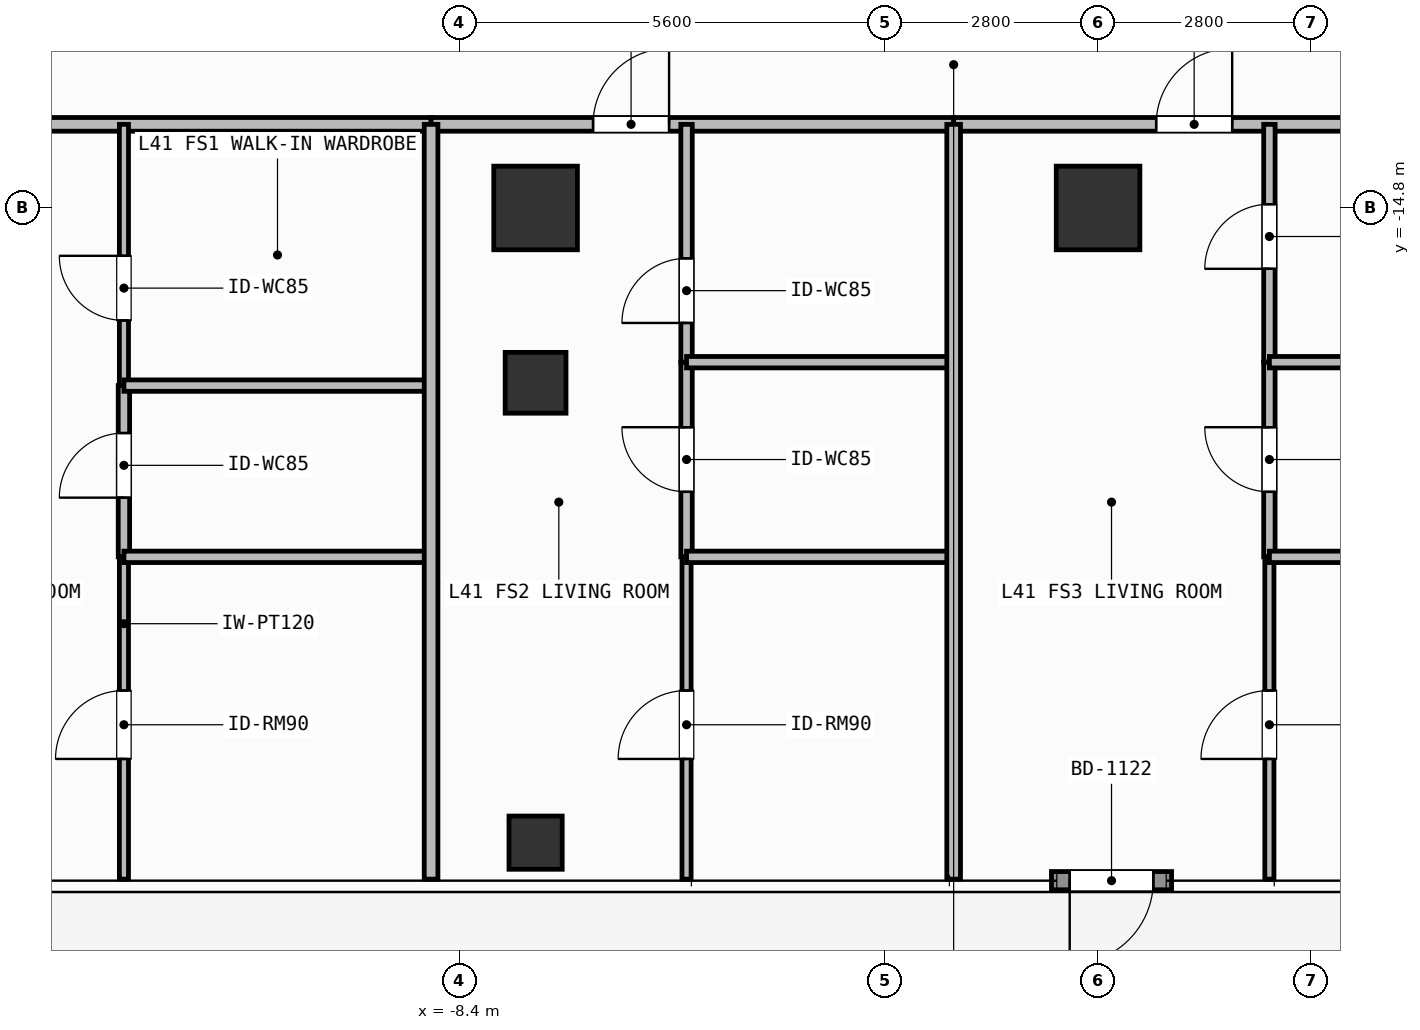
"""IFC4 building model, lengths in metres.
Left out: names, types, materials, properties, quantities, classifications, styles, units other than length and angle.
Written with IfcOpenShell. Run it as: python <this file> out.ifc"""

import sys

from ifc_helpers import new_model, si_unit, direction, frame, frame_2d, origin, origin_2d, place, context, subcontext, project, spatial, rectangle, hollow_rectangle, extrude, element, fill, save


model = new_model("IFC4")
c1 = context("Model", 3, precision=1e-05, world=origin(), true_north=direction((0.0, 1.0)))
c2 = subcontext(c1, "Body", "Model", "MODEL_VIEW")
j1 = project(units=[si_unit("LENGTHUNIT", "METRE"), si_unit("PLANEANGLEUNIT", "RADIAN")], contexts=[c1])
p1 = place(None, origin())
s1 = spatial("IfcSite", under=j1, at=p1, CompositionType="ELEMENT")
p2 = place(p1, origin())
s2 = spatial("IfcBuilding", under=s1, at=p2, CompositionType="ELEMENT")
p3 = place(p2, frame((0.0, 0.0, 168.0)))
s3 = spatial("IfcBuildingStorey", under=s2, at=p3, CompositionType="ELEMENT", Elevation=168.0)
for number, where, z_axis, x_axis in (
    (1, (-7.4, -14.8, 0.0), (0.0, 0.0, 1.0), (1.0, 0.0, 0.0)),
    (2, (0.0, -14.8, 0.0), (0.0, 0.0, 1.0), (1.0, 0.0, 0.0)),
):
    element("IfcColumn", number, at=place(p3, frame(where, z_axis=z_axis, x_axis=x_axis)), inside=s3, PredefinedType="COLUMN", context=c2, shape_type="SweptSolid", body=[
        extrude(rectangle(XDim=1.1, YDim=1.1, at=origin_2d()), origin(), (0.0, 0.0, 1.0), 3.9),
    ])
p4 = place(p3, frame((-7.4, -17.1, 0.0), z_axis=(0.0, 0.0, 1.0), x_axis=(1.0, 0.0, 0.0)))
e3 = element("IfcColumn", 3, at=p4, inside=s3, PredefinedType="COLUMN", context=c2, shape_type="SweptSolid", body=[
    extrude(hollow_rectangle(XDim=0.8, YDim=0.8, WallThickness=0.036, at=origin_2d()), origin(), (0.0, 0.0, 1.0), 3.9),
])
p5 = place(p3, frame((-7.4, -23.15, 0.0), z_axis=(0.0, 0.0, 1.0), x_axis=(1.0, 0.0, 0.0)))
e4 = element("IfcColumn", 4, at=p5, inside=s3, PredefinedType="COLUMN", context=c2, shape_type="SweptSolid", body=[
    extrude(hollow_rectangle(XDim=0.7, YDim=0.7, WallThickness=0.032, at=origin_2d()), origin(), (0.0, 0.0, 1.0), 3.9),
])
p6 = place(p3, frame((0.967, -23.65, 0.0), z_axis=(0.0, 0.0, 1.0), x_axis=(-1.0, 0.0, 0.0)))
e5 = element("IfcWall", 5, at=p6, inside=s3, PredefinedType="SOLIDWALL", context=c2, shape_type="SweptSolid", body=[
    extrude(rectangle(XDim=1.58, YDim=0.24, at=frame_2d((0.79, 0.0))), origin(), (0.0, 0.0, 1.0), 3.68),
])
p7 = place(p6, frame((0.24, 0.0, 0.0)))
e6 = element("IfcOpeningElement", 6, at=p7, cuts=e5, PredefinedType="OPENING", context=c2, shape_type="SweptSolid", body=[
    extrude(rectangle(XDim=1.1, YDim=2.2, at=frame_2d((0.55, 1.1))), frame((0.0, 0.13, 0.0), z_axis=(0.0, -1.0, 0.0), x_axis=(1.0, 0.0, 0.0)), (0.0, 0.0, 1.0), 0.26),
])
p8 = place(p3, frame((-22.12, -13.7, 0.0), z_axis=(0.0, 0.0, 1.0), x_axis=(1.0, 0.0, 0.0)))
e7 = element("IfcWall", 7, at=p8, inside=s3, PredefinedType="PARTITIONING", context=c2, shape_type="SweptSolid", body=[
    extrude(rectangle(XDim=13.345, YDim=0.18, at=frame_2d((6.673, 0.0))), origin(), (0.0, 0.0, 1.0), 3.68),
])
p9 = place(p8, frame((5.724, 0.0, 0.0)))
e8 = element("IfcOpeningElement", 8, at=p9, cuts=e7, PredefinedType="OPENING", context=c2, shape_type="SweptSolid", body=[
    extrude(rectangle(XDim=1.0, YDim=2.2, at=frame_2d((0.5, 1.1))), frame((0.0, 0.1, 0.0), z_axis=(0.0, -1.0, 0.0), x_axis=(1.0, 0.0, 0.0)), (0.0, 0.0, 1.0), 0.2),
])
p10 = place(p3, frame((-12.816, -19.39, 0.0), z_axis=(0.0, 0.0, 1.0), x_axis=(0.0, 1.0, 0.0)))
e9 = element("IfcWall", 9, at=p10, inside=s3, PredefinedType="PARTITIONING", context=c2, shape_type="SweptSolid", body=[
    extrude(rectangle(XDim=2.253, YDim=0.15, at=frame_2d((1.126, 0.0))), origin(), (0.0, 0.0, 1.0), 3.68),
])
p11 = place(p10, frame((0.779, 0.0, 0.0)))
e10 = element("IfcOpeningElement", 10, at=p11, cuts=e9, PredefinedType="OPENING", context=c2, shape_type="SweptSolid", body=[
    extrude(rectangle(XDim=0.85, YDim=2.1, at=frame_2d((0.425, 1.05))), frame((0.0, 0.085, 0.0), z_axis=(0.0, -1.0, 0.0), x_axis=(1.0, 0.0, 0.0)), (0.0, 0.0, 1.0), 0.17),
])
p12 = place(p3, frame((-12.816, -17.137, 0.0), z_axis=(0.0, 0.0, 1.0), x_axis=(0.0, 1.0, 0.0)))
e11 = element("IfcWall", 11, at=p12, inside=s3, PredefinedType="PARTITIONING", context=c2, shape_type="SweptSolid", body=[
    extrude(rectangle(XDim=3.437, YDim=0.12, at=frame_2d((1.719, 0.0))), origin(), (0.0, 0.0, 1.0), 3.68),
])
p13 = place(p12, frame((0.857, 0.0, 0.0)))
e12 = element("IfcOpeningElement", 12, at=p13, cuts=e11, PredefinedType="OPENING", context=c2, shape_type="SweptSolid", body=[
    extrude(rectangle(XDim=0.85, YDim=2.1, at=frame_2d((0.425, 1.05))), frame((0.0, 0.07, 0.0), z_axis=(0.0, -1.0, 0.0), x_axis=(1.0, 0.0, 0.0)), (0.0, 0.0, 1.0), 0.14),
])
p14 = place(p3, frame((-12.816, -23.63, 0.0), z_axis=(0.0, 0.0, 1.0), x_axis=(0.0, 1.0, 0.0)))
e13 = element("IfcWall", 13, at=p14, inside=s3, PredefinedType="PARTITIONING", context=c2, shape_type="SweptSolid", body=[
    extrude(rectangle(XDim=4.24, YDim=0.12, at=frame_2d((2.12, 0.0))), origin(), (0.0, 0.0, 1.0), 3.68),
])
p15 = place(p14, frame((1.581, 0.0, 0.0)))
e14 = element("IfcOpeningElement", 14, at=p15, cuts=e13, PredefinedType="OPENING", context=c2, shape_type="SweptSolid", body=[
    extrude(rectangle(XDim=0.9, YDim=2.1, at=frame_2d((0.45, 1.05))), frame((0.0, 0.07, 0.0), z_axis=(0.0, -1.0, 0.0), x_axis=(1.0, 0.0, 0.0)), (0.0, 0.0, 1.0), 0.14),
])
p16 = place(p3, frame((-8.775, -13.7, 0.0), z_axis=(0.0, 0.0, 1.0), x_axis=(1.0, 0.0, 0.0)))
e15 = element("IfcWall", 15, at=p16, inside=s3, PredefinedType="PARTITIONING", context=c2, shape_type="SweptSolid", body=[
    extrude(rectangle(XDim=6.875, YDim=0.18, at=frame_2d((3.438, 0.0))), origin(), (0.0, 0.0, 1.0), 3.68),
])
p17 = place(p16, frame((2.131, 0.0, 0.0)))
e16 = element("IfcOpeningElement", 16, at=p17, cuts=e15, PredefinedType="OPENING", context=c2, shape_type="SweptSolid", body=[
    extrude(rectangle(XDim=1.0, YDim=2.2, at=frame_2d((0.5, 1.1))), frame((0.0, 0.1, 0.0), z_axis=(0.0, -1.0, 0.0), x_axis=(1.0, 0.0, 0.0)), (0.0, 0.0, 1.0), 0.2),
])
p18 = place(p3, frame((-5.414, -16.829, 0.0), z_axis=(0.0, 0.0, 1.0), x_axis=(0.0, 1.0, 0.0)))
e17 = element("IfcWall", 17, at=p18, inside=s3, PredefinedType="PARTITIONING", context=c2, shape_type="SweptSolid", body=[
    extrude(rectangle(XDim=3.129, YDim=0.15, at=frame_2d((1.564, 0.0))), origin(), (0.0, 0.0, 1.0), 3.68),
])
p19 = place(p18, frame((0.516, 0.0, 0.0)))
e18 = element("IfcOpeningElement", 18, at=p19, cuts=e17, PredefinedType="OPENING", context=c2, shape_type="SweptSolid", body=[
    extrude(rectangle(XDim=0.85, YDim=2.1, at=frame_2d((0.425, 1.05))), frame((0.0, 0.085, 0.0), z_axis=(0.0, -1.0, 0.0), x_axis=(1.0, 0.0, 0.0)), (0.0, 0.0, 1.0), 0.17),
])
p20 = place(p3, frame((-5.414, -19.39, 0.0), z_axis=(0.0, 0.0, 1.0), x_axis=(0.0, 1.0, 0.0)))
e19 = element("IfcWall", 19, at=p20, inside=s3, PredefinedType="PARTITIONING", context=c2, shape_type="SweptSolid", body=[
    extrude(rectangle(XDim=2.561, YDim=0.15, at=frame_2d((1.28, 0.0))), origin(), (0.0, 0.0, 1.0), 3.68),
])
p21 = place(p20, frame((0.855, 0.0, 0.0)))
e20 = element("IfcOpeningElement", 20, at=p21, cuts=e19, PredefinedType="OPENING", context=c2, shape_type="SweptSolid", body=[
    extrude(rectangle(XDim=0.85, YDim=2.1, at=frame_2d((0.425, 1.05))), frame((0.0, 0.085, 0.0), z_axis=(0.0, -1.0, 0.0), x_axis=(1.0, 0.0, 0.0)), (0.0, 0.0, 1.0), 0.17),
])
p22 = place(p3, frame((-5.414, -23.63, 0.0), z_axis=(0.0, 0.0, 1.0), x_axis=(0.0, 1.0, 0.0)))
e21 = element("IfcWall", 21, at=p22, inside=s3, PredefinedType="PARTITIONING", context=c2, shape_type="SweptSolid", body=[
    extrude(rectangle(XDim=4.24, YDim=0.12, at=frame_2d((2.12, 0.0))), origin(), (0.0, 0.0, 1.0), 3.68),
])
p23 = place(p22, frame((1.581, 0.0, 0.0)))
e22 = element("IfcOpeningElement", 22, at=p23, cuts=e21, PredefinedType="OPENING", context=c2, shape_type="SweptSolid", body=[
    extrude(rectangle(XDim=0.9, YDim=2.1, at=frame_2d((0.45, 1.05))), frame((0.0, 0.07, 0.0), z_axis=(0.0, -1.0, 0.0), x_axis=(1.0, 0.0, 0.0)), (0.0, 0.0, 1.0), 0.14),
])
p24 = place(p3, frame((-1.9, -13.7, 0.0), z_axis=(0.0, 0.0, 1.0), x_axis=(1.0, 0.0, 0.0)))
e23 = element("IfcWall", 23, at=p24, inside=s3, PredefinedType="PARTITIONING", context=c2, shape_type="SweptSolid", body=[
    extrude(rectangle(XDim=8.654, YDim=0.18, at=frame_2d((4.327, 0.0))), origin(), (0.0, 0.0, 1.0), 3.68),
])
p25 = place(p24, frame((2.664, 0.0, 0.0)))
e24 = element("IfcOpeningElement", 24, at=p25, cuts=e23, PredefinedType="OPENING", context=c2, shape_type="SweptSolid", body=[
    extrude(rectangle(XDim=1.0, YDim=2.2, at=frame_2d((0.5, 1.1))), frame((0.0, 0.1, 0.0), z_axis=(0.0, -1.0, 0.0), x_axis=(1.0, 0.0, 0.0)), (0.0, 0.0, 1.0), 0.2),
])
p26 = place(p3, frame((2.254, -16.829, 0.0), z_axis=(0.0, 0.0, 1.0), x_axis=(0.0, 1.0, 0.0)))
e25 = element("IfcWall", 25, at=p26, inside=s3, PredefinedType="PARTITIONING", context=c2, shape_type="SweptSolid", body=[
    extrude(rectangle(XDim=3.129, YDim=0.15, at=frame_2d((1.564, 0.0))), origin(), (0.0, 0.0, 1.0), 3.68),
])
p27 = place(p26, frame((1.229, 0.0, 0.0)))
e26 = element("IfcOpeningElement", 26, at=p27, cuts=e25, PredefinedType="OPENING", context=c2, shape_type="SweptSolid", body=[
    extrude(rectangle(XDim=0.85, YDim=2.1, at=frame_2d((0.425, 1.05))), frame((0.0, 0.085, 0.0), z_axis=(0.0, -1.0, 0.0), x_axis=(1.0, 0.0, 0.0)), (0.0, 0.0, 1.0), 0.17),
])
p28 = place(p3, frame((2.254, -19.39, 0.0), z_axis=(0.0, 0.0, 1.0), x_axis=(0.0, 1.0, 0.0)))
e27 = element("IfcWall", 27, at=p28, inside=s3, PredefinedType="PARTITIONING", context=c2, shape_type="SweptSolid", body=[
    extrude(rectangle(XDim=2.561, YDim=0.15, at=frame_2d((1.28, 0.0))), origin(), (0.0, 0.0, 1.0), 3.68),
])
p29 = place(p28, frame((0.855, 0.0, 0.0)))
e28 = element("IfcOpeningElement", 28, at=p29, cuts=e27, PredefinedType="OPENING", context=c2, shape_type="SweptSolid", body=[
    extrude(rectangle(XDim=0.85, YDim=2.1, at=frame_2d((0.425, 1.05))), frame((0.0, 0.085, 0.0), z_axis=(0.0, -1.0, 0.0), x_axis=(1.0, 0.0, 0.0)), (0.0, 0.0, 1.0), 0.17),
])
p30 = place(p3, frame((2.254, -23.63, 0.0), z_axis=(0.0, 0.0, 1.0), x_axis=(0.0, 1.0, 0.0)))
e29 = element("IfcWall", 29, at=p30, inside=s3, PredefinedType="PARTITIONING", context=c2, shape_type="SweptSolid", body=[
    extrude(rectangle(XDim=4.24, YDim=0.12, at=frame_2d((2.12, 0.0))), origin(), (0.0, 0.0, 1.0), 3.68),
])
p31 = place(p30, frame((1.581, 0.0, 0.0)))
e30 = element("IfcOpeningElement", 30, at=p31, cuts=e29, PredefinedType="OPENING", context=c2, shape_type="SweptSolid", body=[
    extrude(rectangle(XDim=0.9, YDim=2.1, at=frame_2d((0.45, 1.05))), frame((0.0, 0.07, 0.0), z_axis=(0.0, -1.0, 0.0), x_axis=(1.0, 0.0, 0.0)), (0.0, 0.0, 1.0), 0.14),
])
p32 = place(p3, frame((-12.816, -17.137, 0.0), z_axis=(0.0, 0.0, 1.0), x_axis=(1.0, 0.0, 0.0)))
e31 = element("IfcWall", 31, at=p32, inside=s3, PredefinedType="PARTITIONING", context=c2, shape_type="SweptSolid", body=[
    extrude(rectangle(XDim=4.041, YDim=0.15, at=frame_2d((2.021, 0.0))), origin(), (0.0, 0.0, 1.0), 3.082),
])
p33 = place(p3, frame((-12.816, -19.39, 0.0), z_axis=(0.0, 0.0, 1.0), x_axis=(1.0, 0.0, 0.0)))
e32 = element("IfcWall", 32, at=p33, inside=s3, PredefinedType="PARTITIONING", context=c2, shape_type="SweptSolid", body=[
    extrude(rectangle(XDim=4.041, YDim=0.15, at=frame_2d((2.021, 0.0))), origin(), (0.0, 0.0, 1.0), 3.68),
])
p34 = place(p3, frame((-5.414, -16.829, 0.0), z_axis=(0.0, 0.0, 1.0), x_axis=(1.0, 0.0, 0.0)))
e33 = element("IfcWall", 33, at=p34, inside=s3, PredefinedType="PARTITIONING", context=c2, shape_type="SweptSolid", body=[
    extrude(rectangle(XDim=3.514, YDim=0.15, at=frame_2d((1.757, 0.0))), origin(), (0.0, 0.0, 1.0), 3.082),
])
p35 = place(p3, frame((-5.414, -19.39, 0.0), z_axis=(0.0, 0.0, 1.0), x_axis=(1.0, 0.0, 0.0)))
e34 = element("IfcWall", 34, at=p35, inside=s3, PredefinedType="PARTITIONING", context=c2, shape_type="SweptSolid", body=[
    extrude(rectangle(XDim=3.514, YDim=0.15, at=frame_2d((1.757, 0.0))), origin(), (0.0, 0.0, 1.0), 3.68),
])
p36 = place(p3, frame((-8.775, -23.63, 0.0), z_axis=(0.0, 0.0, 1.0), x_axis=(0.0, 1.0, 0.0)))
e35 = element("IfcWall", 35, at=p36, inside=s3, PredefinedType="PARTITIONING", context=c2, shape_type="SweptSolid", body=[
    extrude(rectangle(XDim=9.93, YDim=0.18, at=frame_2d((4.965, 0.0))), origin(), (0.0, 0.0, 1.0), 3.68),
])
p37 = place(p3, frame((2.254, -16.829, 0.0), z_axis=(0.0, 0.0, 1.0), x_axis=(1.0, 0.0, 0.0)))
e36 = element("IfcWall", 36, at=p37, inside=s3, PredefinedType="PARTITIONING", context=c2, shape_type="SweptSolid", body=[
    extrude(rectangle(XDim=4.5, YDim=0.15, at=frame_2d((2.25, 0.0))), origin(), (0.0, 0.0, 1.0), 3.082),
])
p38 = place(p3, frame((2.254, -19.39, 0.0), z_axis=(0.0, 0.0, 1.0), x_axis=(1.0, 0.0, 0.0)))
e37 = element("IfcWall", 37, at=p38, inside=s3, PredefinedType="PARTITIONING", context=c2, shape_type="SweptSolid", body=[
    extrude(rectangle(XDim=4.5, YDim=0.15, at=frame_2d((2.25, 0.0))), origin(), (0.0, 0.0, 1.0), 3.68),
])
p39 = place(p3, frame((-1.9, -23.63, 0.0), z_axis=(0.0, 0.0, 1.0), x_axis=(0.0, 1.0, 0.0)))
e38 = element("IfcWall", 38, at=p39, inside=s3, PredefinedType="PARTITIONING", context=c2, shape_type="SweptSolid", body=[
    extrude(rectangle(XDim=9.93, YDim=0.18, at=frame_2d((4.965, 0.0))), origin(), (0.0, 0.0, 1.0), 3.68),
])
p40 = place(p7, origin())
e39 = element("IfcDoor", 39, at=p40, inside=s3, OperationType="SINGLE_SWING_RIGHT", PredefinedType="DOOR", context=c2, shape_type="SweptSolid", body=[
    extrude(rectangle(XDim=1.1, YDim=2.2, at=frame_2d((0.55, 1.1))), frame((0.0, 0.025, 0.0), z_axis=(0.0, -1.0, 0.0), x_axis=(1.0, 0.0, 0.0)), (0.0, 0.0, 1.0), 0.05),
])
fill(e6, e39)
p41 = place(p11, origin())
e40 = element("IfcDoor", 40, at=p41, inside=s3, OperationType="SINGLE_SWING_LEFT", PredefinedType="DOOR", context=c2, shape_type="SweptSolid", body=[
    extrude(rectangle(XDim=0.85, YDim=2.1, at=frame_2d((0.425, 1.05))), frame((0.0, 0.025, 0.0), z_axis=(0.0, -1.0, 0.0), x_axis=(1.0, 0.0, 0.0)), (0.0, 0.0, 1.0), 0.05),
])
fill(e10, e40)
p42 = place(p13, origin())
e41 = element("IfcDoor", 41, at=p42, inside=s3, OperationType="SINGLE_SWING_RIGHT", PredefinedType="DOOR", context=c2, shape_type="SweptSolid", body=[
    extrude(rectangle(XDim=0.85, YDim=2.1, at=frame_2d((0.425, 1.05))), frame((0.0, 0.025, 0.0), z_axis=(0.0, -1.0, 0.0), x_axis=(1.0, 0.0, 0.0)), (0.0, 0.0, 1.0), 0.05),
])
fill(e12, e41)
p43 = place(p15, origin())
e42 = element("IfcDoor", 42, at=p43, inside=s3, OperationType="SINGLE_SWING_LEFT", PredefinedType="DOOR", context=c2, shape_type="SweptSolid", body=[
    extrude(rectangle(XDim=0.9, YDim=2.1, at=frame_2d((0.45, 1.05))), frame((0.0, 0.025, 0.0), z_axis=(0.0, -1.0, 0.0), x_axis=(1.0, 0.0, 0.0)), (0.0, 0.0, 1.0), 0.05),
])
fill(e14, e42)
p44 = place(p17, origin())
e43 = element("IfcDoor", 43, at=p44, inside=s3, OperationType="SINGLE_SWING_RIGHT", PredefinedType="DOOR", context=c2, shape_type="SweptSolid", body=[
    extrude(rectangle(XDim=1.0, YDim=2.2, at=frame_2d((0.5, 1.1))), frame((0.0, 0.025, 0.0), z_axis=(0.0, -1.0, 0.0), x_axis=(1.0, 0.0, 0.0)), (0.0, 0.0, 1.0), 0.05),
])
fill(e16, e43)
p45 = place(p19, origin())
e44 = element("IfcDoor", 44, at=p45, inside=s3, OperationType="SINGLE_SWING_LEFT", PredefinedType="DOOR", context=c2, shape_type="SweptSolid", body=[
    extrude(rectangle(XDim=0.85, YDim=2.1, at=frame_2d((0.425, 1.05))), frame((0.0, 0.025, 0.0), z_axis=(0.0, -1.0, 0.0), x_axis=(1.0, 0.0, 0.0)), (0.0, 0.0, 1.0), 0.05),
])
fill(e18, e44)
p46 = place(p21, origin())
e45 = element("IfcDoor", 45, at=p46, inside=s3, OperationType="SINGLE_SWING_RIGHT", PredefinedType="DOOR", context=c2, shape_type="SweptSolid", body=[
    extrude(rectangle(XDim=0.85, YDim=2.1, at=frame_2d((0.425, 1.05))), frame((0.0, 0.025, 0.0), z_axis=(0.0, -1.0, 0.0), x_axis=(1.0, 0.0, 0.0)), (0.0, 0.0, 1.0), 0.05),
])
fill(e20, e45)
p47 = place(p23, origin())
e46 = element("IfcDoor", 46, at=p47, inside=s3, OperationType="SINGLE_SWING_LEFT", PredefinedType="DOOR", context=c2, shape_type="SweptSolid", body=[
    extrude(rectangle(XDim=0.9, YDim=2.1, at=frame_2d((0.45, 1.05))), frame((0.0, 0.025, 0.0), z_axis=(0.0, -1.0, 0.0), x_axis=(1.0, 0.0, 0.0)), (0.0, 0.0, 1.0), 0.05),
])
fill(e22, e46)
p48 = place(p25, origin())
e47 = element("IfcDoor", 47, at=p48, inside=s3, OperationType="SINGLE_SWING_RIGHT", PredefinedType="DOOR", context=c2, shape_type="SweptSolid", body=[
    extrude(rectangle(XDim=1.0, YDim=2.2, at=frame_2d((0.5, 1.1))), frame((0.0, 0.025, 0.0), z_axis=(0.0, -1.0, 0.0), x_axis=(1.0, 0.0, 0.0)), (0.0, 0.0, 1.0), 0.05),
])
fill(e24, e47)
p49 = place(p27, origin())
e48 = element("IfcDoor", 48, at=p49, inside=s3, OperationType="SINGLE_SWING_LEFT", PredefinedType="DOOR", context=c2, shape_type="SweptSolid", body=[
    extrude(rectangle(XDim=0.85, YDim=2.1, at=frame_2d((0.425, 1.05))), frame((0.0, 0.025, 0.0), z_axis=(0.0, -1.0, 0.0), x_axis=(1.0, 0.0, 0.0)), (0.0, 0.0, 1.0), 0.05),
])
fill(e26, e48)
p50 = place(p29, origin())
e49 = element("IfcDoor", 49, at=p50, inside=s3, OperationType="SINGLE_SWING_RIGHT", PredefinedType="DOOR", context=c2, shape_type="SweptSolid", body=[
    extrude(rectangle(XDim=0.85, YDim=2.1, at=frame_2d((0.425, 1.05))), frame((0.0, 0.025, 0.0), z_axis=(0.0, -1.0, 0.0), x_axis=(1.0, 0.0, 0.0)), (0.0, 0.0, 1.0), 0.05),
])
fill(e28, e49)
p51 = place(p31, origin())
e50 = element("IfcDoor", 50, at=p51, inside=s3, OperationType="SINGLE_SWING_LEFT", PredefinedType="DOOR", context=c2, shape_type="SweptSolid", body=[
    extrude(rectangle(XDim=0.9, YDim=2.1, at=frame_2d((0.45, 1.05))), frame((0.0, 0.025, 0.0), z_axis=(0.0, -1.0, 0.0), x_axis=(1.0, 0.0, 0.0)), (0.0, 0.0, 1.0), 0.05),
])
fill(e30, e50)
save(model, sys.argv[1])
